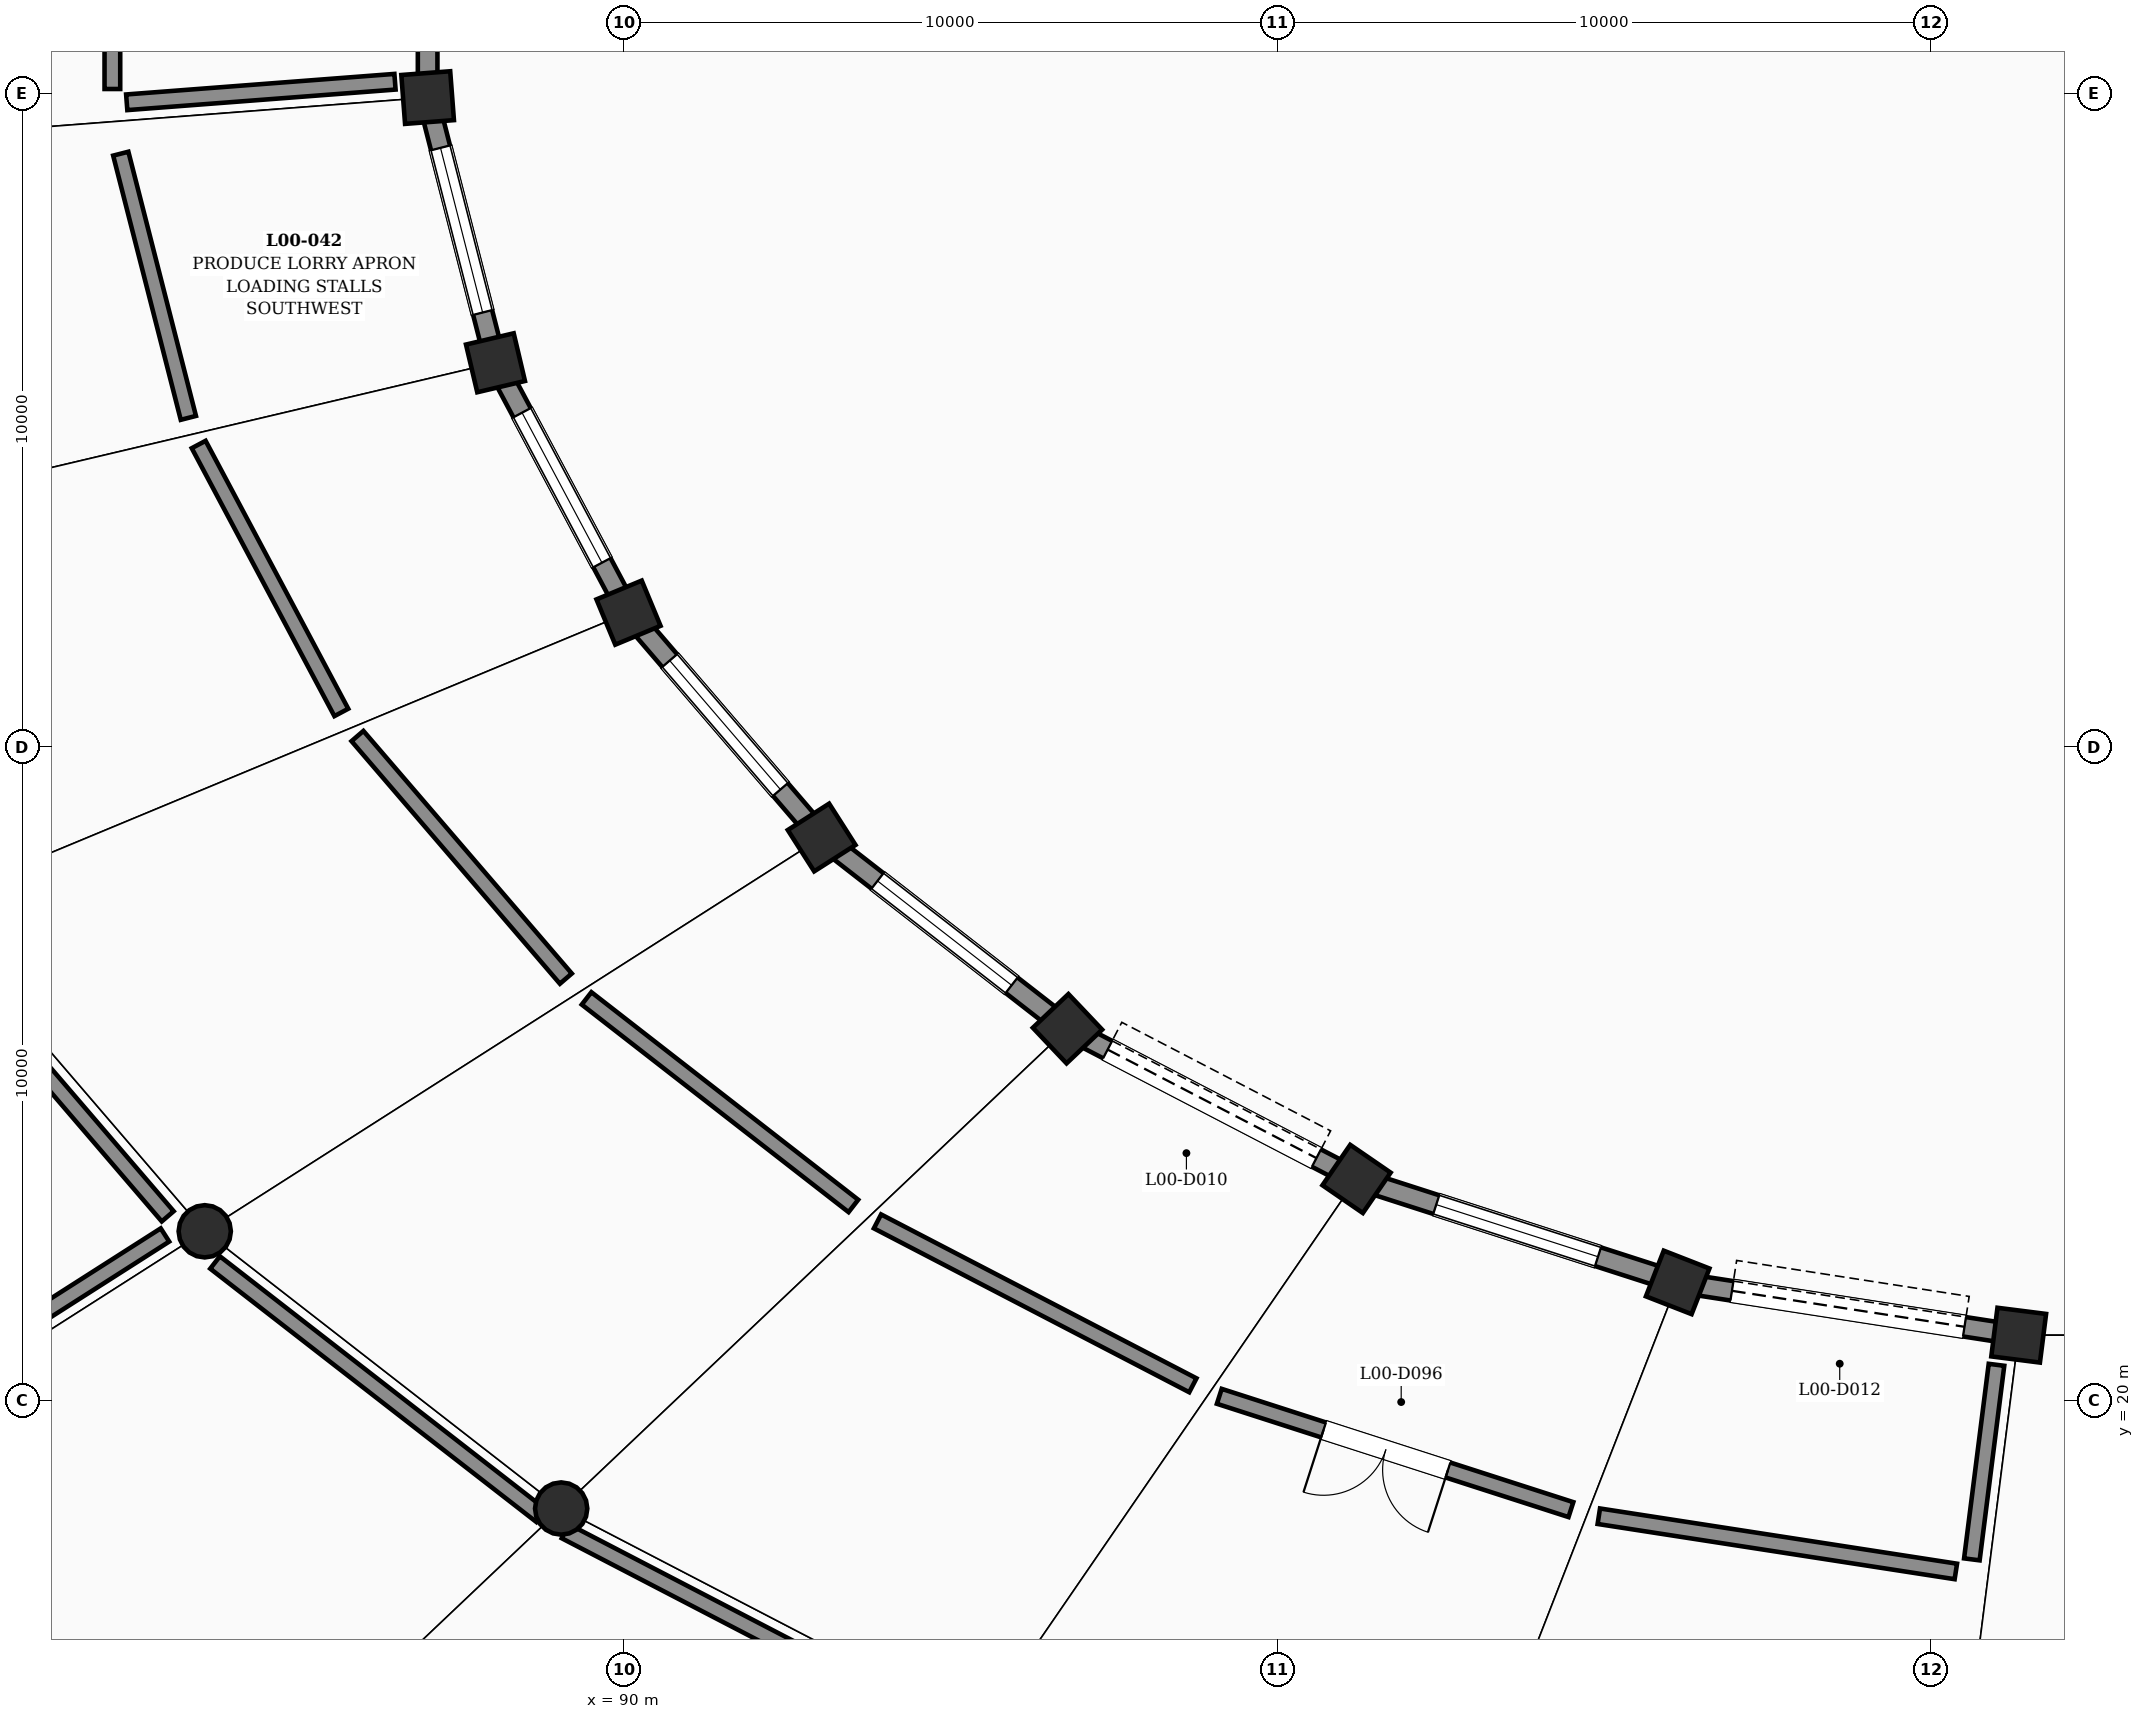
"""IFC4 building model, lengths in metres.
Left out: names, types, materials, properties, quantities, classifications, styles, units other than length and angle.
Written with IfcOpenShell. Run it as: python <this file> out.ifc"""

import sys

from ifc_helpers import new_model, si_unit, direction, frame, frame_2d, origin, origin_2d, place, context, subcontext, project, spatial, rectangle, circle, extrude, element, fill, save


model = new_model("IFC4")
c1 = context("Model", 3, precision=1e-05, world=origin(), true_north=direction((0.0, 1.0)))
c2 = subcontext(c1, "Body", "Model", "MODEL_VIEW")
j1 = project(units=[si_unit("LENGTHUNIT", "METRE"), si_unit("PLANEANGLEUNIT", "RADIAN")], contexts=[c1])
p1 = place(None, origin())
s1 = spatial("IfcSite", under=j1, at=p1, CompositionType="ELEMENT")
p2 = place(p1, origin())
s2 = spatial("IfcBuilding", under=s1, at=p2, CompositionType="ELEMENT")
p3 = place(p2, origin())
s3 = spatial("IfcBuildingStorey", under=s2, at=p3, CompositionType="ELEMENT", Elevation=0.0)
for number, where, z_axis, x_axis in (
    (1, (87.0, 39.932, 0.0), (0.0, 0.0, 1.0), (-0.076, 0.997, 0.0)),
    (2, (88.038, 35.875, 0.0), (0.0, 0.0, 1.0), (-0.23, 0.973, 0.0)),
    (3, (90.073, 32.053, 0.0), (0.0, 0.0, 1.0), (-0.384, 0.923, 0.0)),
):
    element("IfcColumn", number, at=place(p3, frame(where, z_axis=z_axis, x_axis=x_axis)), inside=s3, PredefinedType="COLUMN", context=c2, shape_type="SweptSolid", body=[
        extrude(rectangle(XDim=0.75, YDim=0.75, at=origin_2d()), origin(), (0.0, 0.0, 1.0), 6.0),
    ])
p4 = place(p3, frame((83.59, 22.589, 0.0), z_axis=(0.0, 0.0, 1.0), x_axis=(1.0, 0.0, 0.0)))
e4 = element("IfcColumn", 4, at=p4, inside=s3, PredefinedType="COLUMN", context=c2, shape_type="SweptSolid", body=[
    extrude(circle(Radius=0.4, at=origin_2d()), origin(), (0.0, 0.0, 1.0), 6.0),
])
p5 = place(p3, frame((93.028, 28.613, 0.0), z_axis=(0.0, 0.0, 1.0), x_axis=(-0.538035401546, 0.842922242371, 0.0)))
e5 = element("IfcColumn", 5, at=p5, inside=s3, PredefinedType="COLUMN", context=c2, shape_type="SweptSolid", body=[
    extrude(rectangle(XDim=0.75, YDim=0.75, at=origin_2d()), origin(), (0.0, 0.0, 1.0), 6.0),
])
p6 = place(p3, frame((89.043, 18.348, 0.0), z_axis=(0.0, 0.0, 1.0), x_axis=(1.0, 0.0, 0.0)))
e6 = element("IfcColumn", 6, at=p6, inside=s3, PredefinedType="COLUMN", context=c2, shape_type="SweptSolid", body=[
    extrude(circle(Radius=0.4, at=origin_2d()), origin(), (0.0, 0.0, 1.0), 6.0),
])
for number, where, z_axis, x_axis in (
    (7, (96.789, 25.688, 0.0), (0.0, 0.0, 1.0), (-0.688, 0.726, 0.0)),
    (8, (101.211, 23.39, 0.0), (0.0, 0.0, 1.0), (-0.824, 0.566, 0.0)),
    (9, (106.124, 21.807, 0.0), (0.0, 0.0, 1.0), (-0.932, 0.363, 0.0)),
    (10, (111.341, 21.0, 0.0), (0.0, 0.0, 1.0), (-0.992, 0.126, 0.0)),
):
    element("IfcColumn", number, at=place(p3, frame(where, z_axis=z_axis, x_axis=x_axis)), inside=s3, PredefinedType="COLUMN", context=c2, shape_type="SweptSolid", body=[
        extrude(rectangle(XDim=0.75, YDim=0.75, at=origin_2d()), origin(), (0.0, 0.0, 1.0), 6.0),
    ])
p7 = place(p3, frame((87.0, 43.788, 0.0), z_axis=(0.0, 0.0, 1.0), x_axis=(0.0, -1.0, 0.0)))
e11 = element("IfcWall", 11, at=p7, inside=s3, PredefinedType="SOLIDWALL", context=c2, shape_type="SweptSolid", body=[
    extrude(rectangle(XDim=3.576, YDim=0.3, at=frame_2d((1.788, 0.0))), origin(), (0.0, 0.0, 1.0), 4.95),
])
p8 = place(p7, frame((0.488, 0.0, 1.2)))
e12 = element("IfcOpeningElement", 12, at=p8, cuts=e11, PredefinedType="OPENING", context=c2, shape_type="SweptSolid", body=[
    extrude(rectangle(XDim=2.6, YDim=2.0, at=frame_2d((1.3, 1.0))), frame((0.0, 0.16, 0.0), z_axis=(0.0, -1.0, 0.0), x_axis=(1.0, 0.0, 0.0)), (0.0, 0.0, 1.0), 0.32),
])
p9 = place(p3, frame((87.069, 39.661, 0.0), z_axis=(0.0, 0.0, 1.0), x_axis=(0.247868505824, -0.968793684858, 0.0)))
e13 = element("IfcWall", 13, at=p9, inside=s3, PredefinedType="SOLIDWALL", context=c2, shape_type="SweptSolid", body=[
    extrude(rectangle(XDim=3.628, YDim=0.3, at=frame_2d((1.814, 0.0))), origin(), (0.0, 0.0, 1.0), 4.95),
])
p10 = place(p9, frame((0.514, 0.0, 1.2)))
e14 = element("IfcOpeningElement", 14, at=p10, cuts=e13, PredefinedType="OPENING", context=c2, shape_type="SweptSolid", body=[
    extrude(rectangle(XDim=2.6, YDim=2.0, at=frame_2d((1.3, 1.0))), frame((0.0, 0.16, 0.0), z_axis=(0.0, -1.0, 0.0), x_axis=(1.0, 0.0, 0.0)), (0.0, 0.0, 1.0), 0.32),
])
p11 = place(p3, frame((88.17, 35.628, 0.0), z_axis=(0.0, 0.0, 1.0), x_axis=(0.469993150061, -0.882670062309, 0.0)))
e15 = element("IfcWall", 15, at=p11, inside=s3, PredefinedType="SOLIDWALL", context=c2, shape_type="SweptSolid", body=[
    extrude(rectangle(XDim=3.77, YDim=0.3, at=frame_2d((1.885, 0.0))), origin(), (0.0, 0.0, 1.0), 4.95),
])
p12 = place(p11, frame((0.585, 0.0, 1.2)))
e16 = element("IfcOpeningElement", 16, at=p12, cuts=e15, PredefinedType="OPENING", context=c2, shape_type="SweptSolid", body=[
    extrude(rectangle(XDim=2.6, YDim=2.0, at=frame_2d((1.3, 1.0))), frame((0.0, 0.16, 0.0), z_axis=(0.0, -1.0, 0.0), x_axis=(1.0, 0.0, 0.0)), (0.0, 0.0, 1.0), 0.32),
])
p13 = place(p3, frame((90.256, 31.841, 0.0), z_axis=(0.0, 0.0, 1.0), x_axis=(0.651580132855, -0.758579811535, 0.0)))
e17 = element("IfcWall", 17, at=p13, inside=s3, PredefinedType="SOLIDWALL", context=c2, shape_type="SweptSolid", body=[
    extrude(rectangle(XDim=3.975, YDim=0.3, at=frame_2d((1.987, 0.0))), origin(), (0.0, 0.0, 1.0), 4.95),
])
p14 = place(p13, frame((0.687, 0.0, 1.2)))
e18 = element("IfcOpeningElement", 18, at=p14, cuts=e17, PredefinedType="OPENING", context=c2, shape_type="SweptSolid", body=[
    extrude(rectangle(XDim=2.6, YDim=2.0, at=frame_2d((1.3, 1.0))), frame((0.0, 0.16, 0.0), z_axis=(0.0, -1.0, 0.0), x_axis=(1.0, 0.0, 0.0)), (0.0, 0.0, 1.0), 0.32),
])
p15 = place(p3, frame((93.249, 28.441, 0.0), z_axis=(0.0, 0.0, 1.0), x_axis=(0.789377228816, -0.613908454598, 0.0)))
e19 = element("IfcWall", 19, at=p15, inside=s3, PredefinedType="SOLIDWALL", context=c2, shape_type="SweptSolid", body=[
    extrude(rectangle(XDim=4.205, YDim=0.3, at=frame_2d((2.102, 0.0))), origin(), (0.0, 0.0, 1.0), 4.95),
])
p16 = place(p15, frame((0.802, 0.0, 1.2)))
e20 = element("IfcOpeningElement", 20, at=p16, cuts=e19, PredefinedType="OPENING", context=c2, shape_type="SweptSolid", body=[
    extrude(rectangle(XDim=2.6, YDim=2.0, at=frame_2d((1.3, 1.0))), frame((0.0, 0.16, 0.0), z_axis=(0.0, -1.0, 0.0), x_axis=(1.0, 0.0, 0.0)), (0.0, 0.0, 1.0), 0.32),
])
p17 = place(p3, frame((97.038, 25.559, 0.0), z_axis=(0.0, 0.0, 1.0), x_axis=(0.887318897671, -0.461156344243, 0.0)))
e21 = element("IfcWall", 21, at=p17, inside=s3, PredefinedType="SOLIDWALL", context=c2, shape_type="SweptSolid", body=[
    extrude(rectangle(XDim=4.423, YDim=0.3, at=frame_2d((2.211, 0.0))), origin(), (0.0, 0.0, 1.0), 4.95),
])
p18 = place(p17, frame((0.412, 0.0, 0.0)))
e22 = element("IfcOpeningElement", 22, at=p18, cuts=e21, PredefinedType="OPENING", context=c2, shape_type="SweptSolid", body=[
    extrude(rectangle(XDim=3.6, YDim=4.2, at=frame_2d((1.8, 2.1))), frame((0.0, 0.16, 0.0), z_axis=(0.0, -1.0, 0.0), x_axis=(1.0, 0.0, 0.0)), (0.0, 0.0, 1.0), 0.32),
])
p19 = place(p3, frame((101.478, 23.304, 0.0), z_axis=(0.0, 0.0, 1.0), x_axis=(0.951803081213, -0.306709788879, 0.0)))
e23 = element("IfcWall", 23, at=p19, inside=s3, PredefinedType="SOLIDWALL", context=c2, shape_type="SweptSolid", body=[
    extrude(rectangle(XDim=4.602, YDim=0.3, at=frame_2d((2.301, 0.0))), origin(), (0.0, 0.0, 1.0), 4.95),
])
p20 = place(p19, frame((1.001, 0.0, 1.2)))
e24 = element("IfcOpeningElement", 24, at=p20, cuts=e23, PredefinedType="OPENING", context=c2, shape_type="SweptSolid", body=[
    extrude(rectangle(XDim=2.6, YDim=2.0, at=frame_2d((1.3, 1.0))), frame((0.0, 0.16, 0.0), z_axis=(0.0, -1.0, 0.0), x_axis=(1.0, 0.0, 0.0)), (0.0, 0.0, 1.0), 0.32),
])
p21 = place(p3, frame((106.401, 21.764, 0.0), z_axis=(0.0, 0.0, 1.0), x_axis=(0.988245159336, -0.152877418377, 0.0)))
e25 = element("IfcWall", 25, at=p21, inside=s3, PredefinedType="SOLIDWALL", context=c2, shape_type="SweptSolid", body=[
    extrude(rectangle(XDim=4.719, YDim=0.3, at=frame_2d((2.359, 0.0))), origin(), (0.0, 0.0, 1.0), 4.95),
])
p22 = place(p21, frame((0.56, 0.0, 0.0)))
e26 = element("IfcOpeningElement", 26, at=p22, cuts=e25, PredefinedType="OPENING", context=c2, shape_type="SweptSolid", body=[
    extrude(rectangle(XDim=3.6, YDim=4.2, at=frame_2d((1.8, 2.1))), frame((0.0, 0.16, 0.0), z_axis=(0.0, -1.0, 0.0), x_axis=(1.0, 0.0, 0.0)), (0.0, 0.0, 1.0), 0.32),
])
p23 = place(p3, frame((79.216, 27.255, 0.0), z_axis=(0.0, 0.0, 1.0), x_axis=(0.651228013389, -0.758882121662, 0.0)))
e27 = element("IfcWall", 27, at=p23, inside=s3, PredefinedType="PARTITIONING", context=c2, shape_type="SweptSolid", body=[
    extrude(rectangle(XDim=5.846, YDim=0.24, at=frame_2d((2.923, 0.0))), origin(), (0.0, 0.0, 1.0), 4.78),
])
p24 = place(p3, frame((82.981, 22.533, 0.0), z_axis=(0.0, 0.0, 1.0), x_axis=(-0.842964574038, -0.537969076171, 0.0)))
e28 = element("IfcWall", 28, at=p24, inside=s3, PredefinedType="PARTITIONING", context=c2, shape_type="SweptSolid", body=[
    extrude(rectangle(XDim=12.678, YDim=0.24, at=frame_2d((6.339, 0.0))), origin(), (0.0, 0.0, 1.0), 4.78),
])
p25 = place(p24, frame((5.489, 0.0, 0.0)))
e29 = element("IfcOpeningElement", 29, at=p25, cuts=e28, PredefinedType="OPENING", context=c2, shape_type="SweptSolid", body=[
    extrude(rectangle(XDim=2.2, YDim=2.35, at=frame_2d((1.1, 1.175))), frame((0.0, 0.13, 0.0), z_axis=(0.0, -1.0, 0.0), x_axis=(1.0, 0.0, 0.0)), (0.0, 0.0, 1.0), 0.26),
])
p26 = place(p3, frame((83.748, 22.112, 0.0), z_axis=(0.0, 0.0, 1.0), x_axis=(0.789755642967, -0.613421571517, 0.0)))
e30 = element("IfcWall", 30, at=p26, inside=s3, PredefinedType="PARTITIONING", context=c2, shape_type="SweptSolid", body=[
    extrude(rectangle(XDim=6.319, YDim=0.24, at=frame_2d((3.16, 0.0))), origin(), (0.0, 0.0, 1.0), 4.78),
])
p27 = place(p3, frame((89.107, 18.0, 0.0), z_axis=(0.0, 0.0, 1.0), x_axis=(0.887430939063, -0.460940699433, 0.0)))
e31 = element("IfcWall", 31, at=p27, inside=s3, PredefinedType="PARTITIONING", context=c2, shape_type="SweptSolid", body=[
    extrude(rectangle(XDim=6.81, YDim=0.24, at=frame_2d((3.405, 0.0))), origin(), (0.0, 0.0, 1.0), 4.78),
])
p28 = place(p3, frame((86.5, 40.174, 0.0), z_axis=(0.0, 0.0, 1.0), x_axis=(-0.997077468559, -0.07639713144, 0.0)))
e32 = element("IfcWall", 32, at=p28, inside=s3, PredefinedType="PARTITIONING", context=c2, shape_type="SweptSolid", body=[
    extrude(rectangle(XDim=4.116, YDim=0.24, at=frame_2d((2.058, 0.0))), origin(), (0.0, 0.0, 1.0), 5.68),
])
p29 = place(p3, frame((82.177, 40.063, 0.0), z_axis=(0.0, 0.0, 1.0), x_axis=(0.0, 1.0, 0.0)))
e33 = element("IfcWall", 33, at=p29, inside=s3, PredefinedType="PARTITIONING", context=c2, shape_type="SweptSolid", body=[
    extrude(rectangle(XDim=4.141, YDim=0.24, at=frame_2d((2.071, 0.0))), origin(), (0.0, 0.0, 1.0), 5.68),
])
p30 = place(p3, frame((104.49, 18.332, 0.0), z_axis=(0.0, 0.0, 1.0), x_axis=(-0.951827438235, 0.306634192193, 0.0)))
e34 = element("IfcWall", 34, at=p30, inside=s3, PredefinedType="PARTITIONING", context=c2, shape_type="SweptSolid", body=[
    extrude(rectangle(XDim=5.651, YDim=0.24, at=frame_2d((2.826, 0.0))), origin(), (0.0, 0.0, 1.0), 5.68),
])
p31 = place(p30, frame((1.976, 0.0, 0.0)))
e35 = element("IfcOpeningElement", 35, at=p31, cuts=e34, PredefinedType="OPENING", context=c2, shape_type="SweptSolid", body=[
    extrude(rectangle(XDim=2.0, YDim=2.35, at=frame_2d((1.0, 1.175))), frame((0.0, 0.13, 0.0), z_axis=(0.0, -1.0, 0.0), x_axis=(1.0, 0.0, 0.0)), (0.0, 0.0, 1.0), 0.26),
])
p32 = place(p3, frame((98.707, 20.233, 0.0), z_axis=(0.0, 0.0, 1.0), x_axis=(-0.88734982981, 0.461096822301, 0.0)))
e36 = element("IfcWall", 36, at=p32, inside=s3, PredefinedType="PARTITIONING", context=c2, shape_type="SweptSolid", body=[
    extrude(rectangle(XDim=5.437, YDim=0.24, at=frame_2d((2.719, 0.0))), origin(), (0.0, 0.0, 1.0), 5.68),
])
p33 = place(p3, frame((93.513, 22.977, 0.0), z_axis=(0.0, 0.0, 1.0), x_axis=(-0.789326793675, 0.613973299734, 0.0)))
e37 = element("IfcWall", 37, at=p33, inside=s3, PredefinedType="PARTITIONING", context=c2, shape_type="SweptSolid", body=[
    extrude(rectangle(XDim=5.171, YDim=0.24, at=frame_2d((2.585, 0.0))), origin(), (0.0, 0.0, 1.0), 5.68),
])
p34 = place(p3, frame((89.115, 26.454, 0.0), z_axis=(0.0, 0.0, 1.0), x_axis=(-0.651612898083, 0.758551666699, 0.0)))
e38 = element("IfcWall", 38, at=p34, inside=s3, PredefinedType="PARTITIONING", context=c2, shape_type="SweptSolid", body=[
    extrude(rectangle(XDim=4.893, YDim=0.24, at=frame_2d((2.446, 0.0))), origin(), (0.0, 0.0, 1.0), 5.68),
])
p35 = place(p3, frame((85.68, 30.526, 0.0), z_axis=(0.0, 0.0, 1.0), x_axis=(-0.469990490092, 0.882671478651, 0.0)))
e39 = element("IfcWall", 39, at=p35, inside=s3, PredefinedType="PARTITIONING", context=c2, shape_type="SweptSolid", body=[
    extrude(rectangle(XDim=4.644, YDim=0.24, at=frame_2d((2.322, 0.0))), origin(), (0.0, 0.0, 1.0), 5.68),
])
p36 = place(p3, frame((83.34, 35.032, 0.0), z_axis=(0.0, 0.0, 1.0), x_axis=(-0.247874121908, 0.96879224795, 0.0)))
e40 = element("IfcWall", 40, at=p36, inside=s3, PredefinedType="PARTITIONING", context=c2, shape_type="SweptSolid", body=[
    extrude(rectangle(XDim=4.172, YDim=0.24, at=frame_2d((2.086, 0.0))), origin(), (0.0, 0.0, 1.0), 5.68),
])
p37 = place(p3, frame((111.001, 20.547, 0.0), z_axis=(0.0, 0.0, 1.0), x_axis=(-0.125647100355, -0.992075000276, 0.0)))
e41 = element("IfcWall", 41, at=p37, inside=s3, PredefinedType="PARTITIONING", context=c2, shape_type="SweptSolid", body=[
    extrude(rectangle(XDim=3.0, YDim=0.24, at=frame_2d((1.5, 0.0))), origin(), (0.0, 0.0, 1.0), 5.68),
])
p38 = place(p3, frame((110.38, 17.385, 0.0), z_axis=(0.0, 0.0, 1.0), x_axis=(-0.988245226762, 0.152876982516, 0.0)))
e42 = element("IfcWall", 42, at=p38, inside=s3, PredefinedType="PARTITIONING", context=c2, shape_type="SweptSolid", body=[
    extrude(rectangle(XDim=5.527, YDim=0.24, at=frame_2d((2.764, 0.0))), origin(), (0.0, 0.0, 1.0), 5.68),
])
p39 = place(p10, origin())
e43 = element("IfcWindow", 43, at=p39, inside=s3, PartitioningType="SINGLE_PANEL", PredefinedType="WINDOW", context=c2, shape_type="SweptSolid", body=[
    extrude(rectangle(XDim=2.6, YDim=2.0, at=frame_2d((1.3, 1.0))), frame((0.0, 0.03, 0.0), z_axis=(0.0, -1.0, 0.0), x_axis=(1.0, 0.0, 0.0)), (0.0, 0.0, 1.0), 0.06),
])
fill(e14, e43)
p40 = place(p12, origin())
e44 = element("IfcWindow", 44, at=p40, inside=s3, PartitioningType="SINGLE_PANEL", PredefinedType="WINDOW", context=c2, shape_type="SweptSolid", body=[
    extrude(rectangle(XDim=2.6, YDim=2.0, at=frame_2d((1.3, 1.0))), frame((0.0, 0.03, 0.0), z_axis=(0.0, -1.0, 0.0), x_axis=(1.0, 0.0, 0.0)), (0.0, 0.0, 1.0), 0.06),
])
fill(e16, e44)
p41 = place(p14, origin())
e45 = element("IfcWindow", 45, at=p41, inside=s3, PartitioningType="SINGLE_PANEL", PredefinedType="WINDOW", context=c2, shape_type="SweptSolid", body=[
    extrude(rectangle(XDim=2.6, YDim=2.0, at=frame_2d((1.3, 1.0))), frame((0.0, 0.03, 0.0), z_axis=(0.0, -1.0, 0.0), x_axis=(1.0, 0.0, 0.0)), (0.0, 0.0, 1.0), 0.06),
])
fill(e18, e45)
p42 = place(p16, origin())
e46 = element("IfcWindow", 46, at=p42, inside=s3, PartitioningType="SINGLE_PANEL", PredefinedType="WINDOW", context=c2, shape_type="SweptSolid", body=[
    extrude(rectangle(XDim=2.6, YDim=2.0, at=frame_2d((1.3, 1.0))), frame((0.0, 0.03, 0.0), z_axis=(0.0, -1.0, 0.0), x_axis=(1.0, 0.0, 0.0)), (0.0, 0.0, 1.0), 0.06),
])
fill(e20, e46)
p43 = place(p18, origin())
e47 = element("IfcDoor", 47, at=p43, inside=s3, OperationType="ROLLINGUP", PredefinedType="DOOR", context=c2, shape_type="SweptSolid", body=[
    extrude(rectangle(XDim=3.6, YDim=4.2, at=frame_2d((1.8, 2.1))), frame((0.0, 0.025, 0.0), z_axis=(0.0, -1.0, 0.0), x_axis=(1.0, 0.0, 0.0)), (0.0, 0.0, 1.0), 0.05),
])
fill(e22, e47)
p44 = place(p20, origin())
e48 = element("IfcWindow", 48, at=p44, inside=s3, PartitioningType="SINGLE_PANEL", PredefinedType="WINDOW", context=c2, shape_type="SweptSolid", body=[
    extrude(rectangle(XDim=2.6, YDim=2.0, at=frame_2d((1.3, 1.0))), frame((0.0, 0.03, 0.0), z_axis=(0.0, -1.0, 0.0), x_axis=(1.0, 0.0, 0.0)), (0.0, 0.0, 1.0), 0.06),
])
fill(e24, e48)
p45 = place(p22, origin())
e49 = element("IfcDoor", 49, at=p45, inside=s3, OperationType="ROLLINGUP", PredefinedType="DOOR", context=c2, shape_type="SweptSolid", body=[
    extrude(rectangle(XDim=3.6, YDim=4.2, at=frame_2d((1.8, 2.1))), frame((0.0, 0.025, 0.0), z_axis=(0.0, -1.0, 0.0), x_axis=(1.0, 0.0, 0.0)), (0.0, 0.0, 1.0), 0.05),
])
fill(e26, e49)
p46 = place(p31, origin())
e50 = element("IfcDoor", 50, at=p46, inside=s3, OperationType="DOUBLE_DOOR_SINGLE_SWING", PredefinedType="DOOR", context=c2, shape_type="SweptSolid", body=[
    extrude(rectangle(XDim=2.0, YDim=2.35, at=frame_2d((1.0, 1.175))), frame((0.0, 0.025, 0.0), z_axis=(0.0, -1.0, 0.0), x_axis=(1.0, 0.0, 0.0)), (0.0, 0.0, 1.0), 0.05),
])
fill(e35, e50)
save(model, sys.argv[1])
